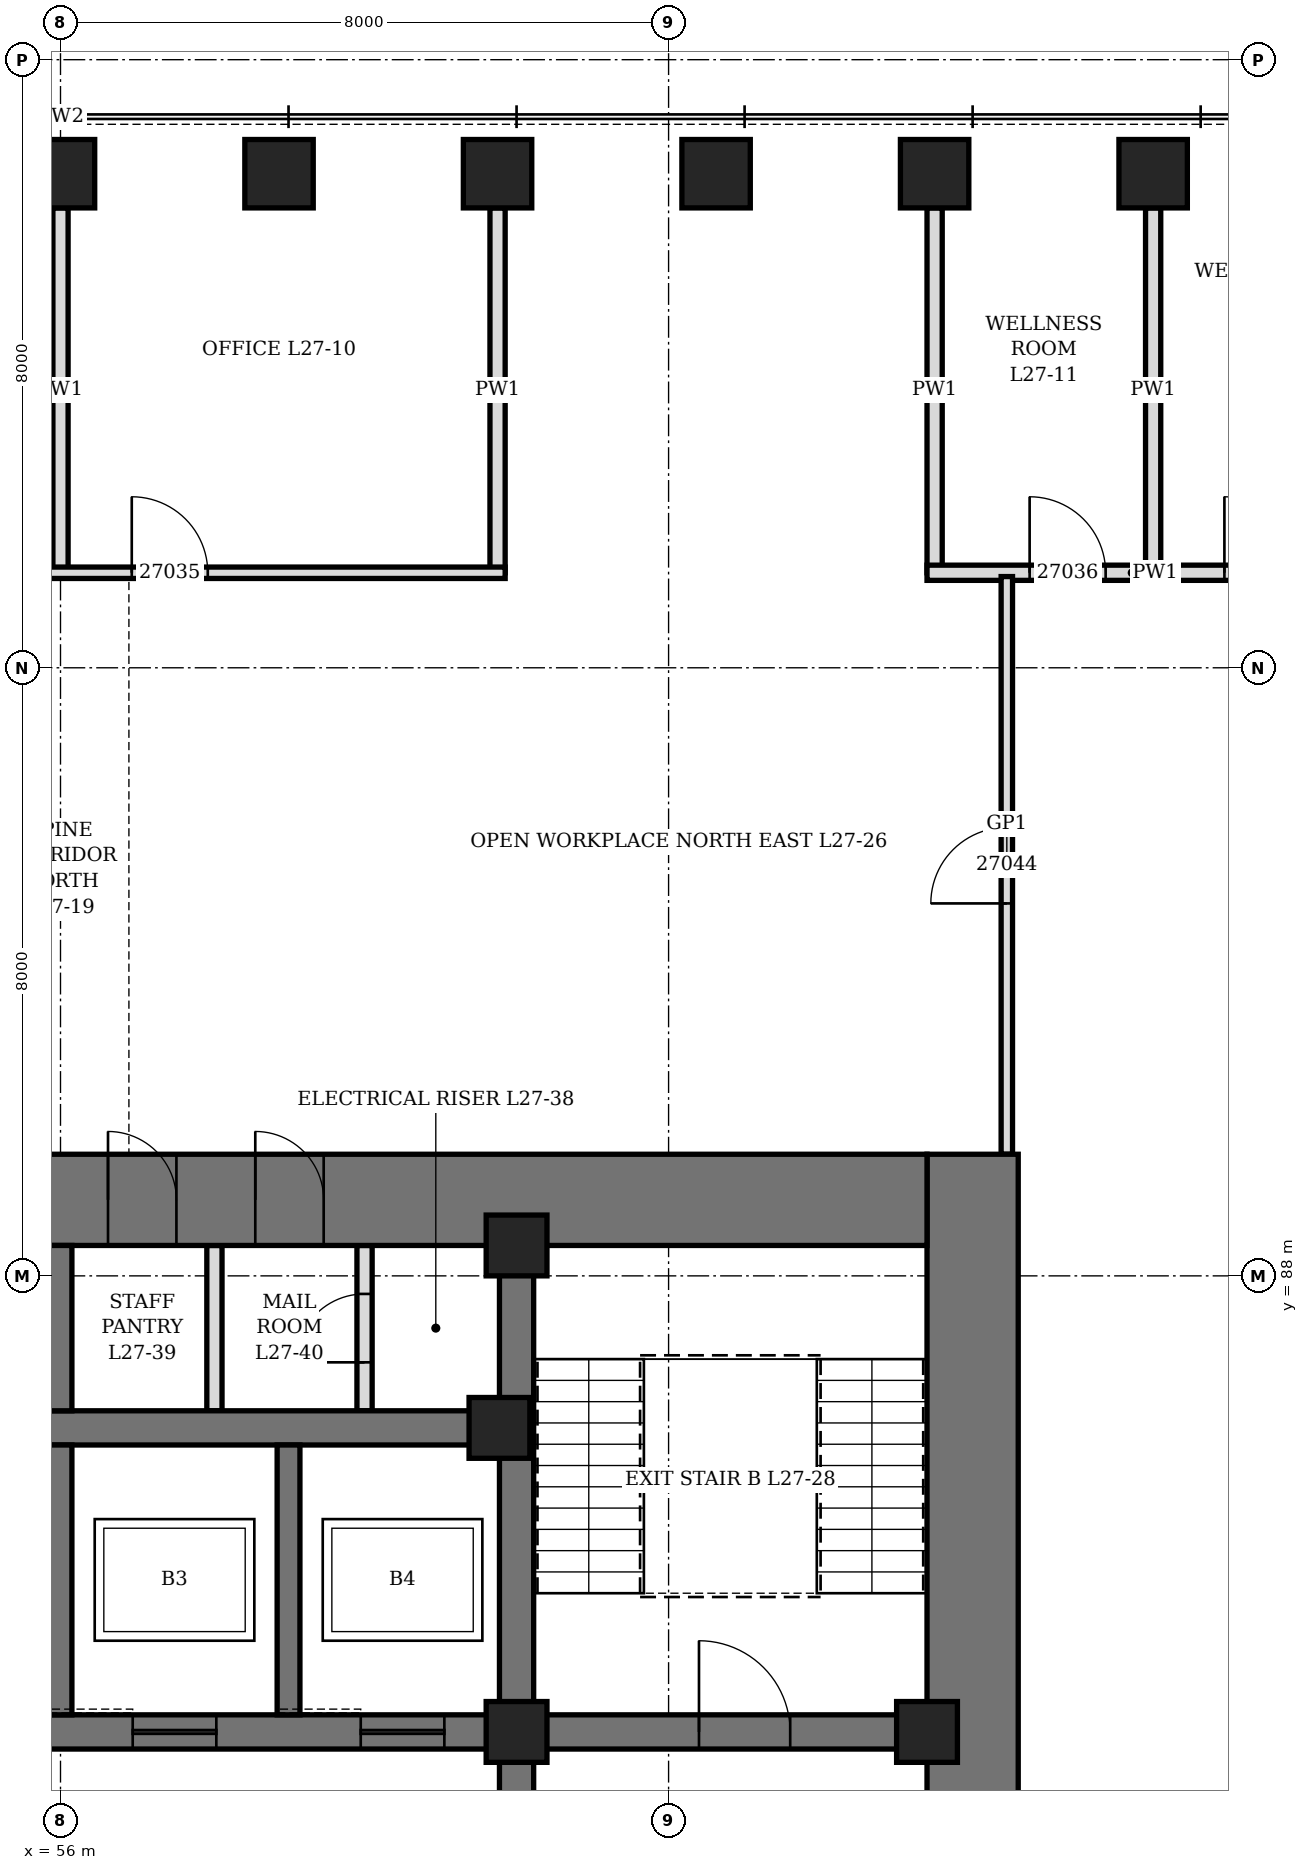
"""IFC4 building model, lengths in metres.
Left out: names, types, materials, properties, quantities, classifications, styles, units other than length and angle.
Written with IfcOpenShell. Run it as: python <this file> out.ifc"""

import sys

from ifc_helpers import new_model, si_unit, direction, frame, frame_2d, origin, origin_2d, place, context, subcontext, project, spatial, rectangle, hollow_rectangle, extrude, element, fill, save


model = new_model("IFC4")
c1 = context("Model", 3, precision=1e-05, world=origin(), true_north=direction((0.0, 1.0)))
c2 = subcontext(c1, "Body", "Model", "MODEL_VIEW")
j1 = project(units=[si_unit("LENGTHUNIT", "METRE"), si_unit("PLANEANGLEUNIT", "RADIAN")], contexts=[c1])
p1 = place(None, origin())
s1 = spatial("IfcSite", under=j1, at=p1, CompositionType="ELEMENT")
p2 = place(p1, origin())
s2 = spatial("IfcBuilding", under=s1, at=p2, CompositionType="ELEMENT")
p3 = place(p2, frame((0.0, 0.0, 124.9)))
s3 = spatial("IfcBuildingStorey", under=s2, at=p3, CompositionType="ELEMENT", Elevation=124.9)
for number, where, z_axis, x_axis in (
    (1, (70.375, 102.5, 0.0), (0.0, 0.0, 1.0), (1.0, 0.0, 0.0)),
    (2, (67.5, 102.5, 0.0), (0.0, 0.0, 1.0), (1.0, 0.0, 0.0)),
    (3, (64.625, 102.5, 0.0), (0.0, 0.0, 1.0), (1.0, 0.0, 0.0)),
    (4, (61.75, 102.5, 0.0), (0.0, 0.0, 1.0), (1.0, 0.0, 0.0)),
    (5, (58.875, 102.5, 0.0), (0.0, 0.0, 1.0), (1.0, 0.0, 0.0)),
    (6, (56.0, 102.5, 0.0), (0.0, 0.0, 1.0), (1.0, 0.0, 0.0)),
):
    element("IfcColumn", number, at=place(p3, frame(where, z_axis=z_axis, x_axis=x_axis)), inside=s3, PredefinedType="COLUMN", context=c2, shape_type="SweptSolid", body=[
        extrude(hollow_rectangle(XDim=0.9, YDim=0.9, WallThickness=0.15, at=origin_2d()), origin(), (0.0, 0.0, 1.0), 4.2),
    ])
p4 = place(p3, frame((68.0, 70.4, 0.0), z_axis=(0.0, 0.0, 1.0), x_axis=(0.0, 1.0, 0.0)))
e7 = element("IfcWall", 7, at=p4, inside=s3, PredefinedType="SHEAR", context=c2, shape_type="SweptSolid", body=[
    extrude(rectangle(XDim=19.2, YDim=1.2, at=frame_2d((9.6, 0.0))), origin(), (0.0, 0.0, 1.0), 4.2),
])
p5 = place(p4, frame((8.6, 0.0, 0.0)))
e8 = element("IfcOpeningElement", 8, at=p5, cuts=e7, PredefinedType="OPENING", context=c2, shape_type="SweptSolid", body=[
    extrude(rectangle(XDim=2.0, YDim=2.4, at=frame_2d((1.0, 1.2))), frame((0.0, 0.61, 0.0), z_axis=(0.0, -1.0, 0.0), x_axis=(1.0, 0.0, 0.0)), (0.0, 0.0, 1.0), 1.22),
])
p6 = place(p3, frame((44.6, 89.0, 0.0), z_axis=(0.0, 0.0, 1.0), x_axis=(1.0, 0.0, 0.0)))
e9 = element("IfcWall", 9, at=p6, inside=s3, PredefinedType="SHEAR", context=c2, shape_type="SweptSolid", body=[
    extrude(rectangle(XDim=22.8, YDim=1.2, at=frame_2d((11.4, 0.0))), origin(), (0.0, 0.0, 1.0), 4.2),
])
p7 = place(p6, frame((6.525, 0.0, 0.0)))
e10 = element("IfcOpeningElement", 10, at=p7, cuts=e9, PredefinedType="OPENING", context=c2, shape_type="SweptSolid", body=[
    extrude(rectangle(XDim=1.0, YDim=2.1, at=frame_2d((0.5, 1.05))), frame((0.0, 0.61, 0.0), z_axis=(0.0, -1.0, 0.0), x_axis=(1.0, 0.0, 0.0)), (0.0, 0.0, 1.0), 1.22),
])
p8 = place(p6, frame((9.45, 0.0, 0.0)))
e11 = element("IfcOpeningElement", 11, at=p8, cuts=e9, PredefinedType="OPENING", context=c2, shape_type="SweptSolid", body=[
    extrude(rectangle(XDim=0.9, YDim=2.1, at=frame_2d((0.45, 1.05))), frame((0.0, 0.61, 0.0), z_axis=(0.0, -1.0, 0.0), x_axis=(1.0, 0.0, 0.0)), (0.0, 0.0, 1.0), 1.22),
])
p9 = place(p6, frame((12.025, 0.0, 0.0)))
e12 = element("IfcOpeningElement", 12, at=p9, cuts=e9, PredefinedType="OPENING", context=c2, shape_type="SweptSolid", body=[
    extrude(rectangle(XDim=0.9, YDim=2.1, at=frame_2d((0.45, 1.05))), frame((0.0, 0.61, 0.0), z_axis=(0.0, -1.0, 0.0), x_axis=(1.0, 0.0, 0.0)), (0.0, 0.0, 1.0), 1.22),
])
p10 = place(p6, frame((13.962, 0.0, 0.0)))
e13 = element("IfcOpeningElement", 13, at=p10, cuts=e9, PredefinedType="OPENING", context=c2, shape_type="SweptSolid", body=[
    extrude(rectangle(XDim=0.9, YDim=2.1, at=frame_2d((0.45, 1.05))), frame((0.0, 0.61, 0.0), z_axis=(0.0, -1.0, 0.0), x_axis=(1.0, 0.0, 0.0)), (0.0, 0.0, 1.0), 1.22),
])
p11 = place(p3, frame((62.0, 71.6, 0.0), z_axis=(0.0, 0.0, 1.0), x_axis=(0.0, 1.0, 0.0)))
e14 = element("IfcWall", 14, at=p11, inside=s3, PredefinedType="SHEAR", context=c2, shape_type="SweptSolid", body=[
    extrude(rectangle(XDim=16.8, YDim=0.45, at=frame_2d((8.4, 0.0))), origin(), (0.0, 0.0, 1.0), 4.2),
])
p12 = place(p11, frame((7.5, 0.0, 0.0)))
e15 = element("IfcOpeningElement", 15, at=p12, cuts=e14, PredefinedType="OPENING", context=c2, shape_type="SweptSolid", body=[
    extrude(rectangle(XDim=1.8, YDim=2.4, at=frame_2d((0.9, 1.2))), frame((0.0, 0.235, 0.0), z_axis=(0.0, -1.0, 0.0), x_axis=(1.0, 0.0, 0.0)), (0.0, 0.0, 1.0), 0.47),
])
p13 = place(p3, frame((62.225, 82.0, 0.0), z_axis=(0.0, 0.0, 1.0), x_axis=(1.0, 0.0, 0.0)))
e16 = element("IfcWall", 16, at=p13, inside=s3, PredefinedType="SHEAR", context=c2, shape_type="SweptSolid", body=[
    extrude(rectangle(XDim=5.175, YDim=0.45, at=frame_2d((2.587, 0.0))), origin(), (0.0, 0.0, 1.0), 4.2),
])
p14 = place(p13, frame((2.175, 0.0, 0.0)))
e17 = element("IfcOpeningElement", 17, at=p14, cuts=e16, PredefinedType="OPENING", context=c2, shape_type="SweptSolid", body=[
    extrude(rectangle(XDim=1.2, YDim=2.1, at=frame_2d((0.6, 1.05))), frame((0.0, 0.235, 0.0), z_axis=(0.0, -1.0, 0.0), x_axis=(1.0, 0.0, 0.0)), (0.0, 0.0, 1.0), 0.47),
])
p15 = place(p3, frame((50.225, 82.0, 0.0), z_axis=(0.0, 0.0, 1.0), x_axis=(1.0, 0.0, 0.0)))
e18 = element("IfcWall", 18, at=p15, inside=s3, PredefinedType="SHEAR", context=c2, shape_type="SweptSolid", body=[
    extrude(rectangle(XDim=11.55, YDim=0.45, at=frame_2d((5.775, 0.0))), origin(), (0.0, 0.0, 1.0), 4.2),
])
p16 = place(p15, frame((0.725, 0.0, 0.0)))
e19 = element("IfcOpeningElement", 19, at=p16, cuts=e18, PredefinedType="OPENING", context=c2, shape_type="SweptSolid", body=[
    extrude(rectangle(XDim=1.1, YDim=2.2, at=frame_2d((0.55, 1.1))), frame((0.0, 0.235, 0.0), z_axis=(0.0, -1.0, 0.0), x_axis=(1.0, 0.0, 0.0)), (0.0, 0.0, 1.0), 0.47),
])
p17 = place(p15, frame((3.725, 0.0, 0.0)))
e20 = element("IfcOpeningElement", 20, at=p17, cuts=e18, PredefinedType="OPENING", context=c2, shape_type="SweptSolid", body=[
    extrude(rectangle(XDim=1.1, YDim=2.2, at=frame_2d((0.55, 1.1))), frame((0.0, 0.235, 0.0), z_axis=(0.0, -1.0, 0.0), x_axis=(1.0, 0.0, 0.0)), (0.0, 0.0, 1.0), 0.47),
])
p18 = place(p15, frame((6.725, 0.0, 0.0)))
e21 = element("IfcOpeningElement", 21, at=p18, cuts=e18, PredefinedType="OPENING", context=c2, shape_type="SweptSolid", body=[
    extrude(rectangle(XDim=1.1, YDim=2.2, at=frame_2d((0.55, 1.1))), frame((0.0, 0.235, 0.0), z_axis=(0.0, -1.0, 0.0), x_axis=(1.0, 0.0, 0.0)), (0.0, 0.0, 1.0), 0.47),
])
p19 = place(p15, frame((9.725, 0.0, 0.0)))
e22 = element("IfcOpeningElement", 22, at=p19, cuts=e18, PredefinedType="OPENING", context=c2, shape_type="SweptSolid", body=[
    extrude(rectangle(XDim=1.1, YDim=2.2, at=frame_2d((0.55, 1.1))), frame((0.0, 0.235, 0.0), z_axis=(0.0, -1.0, 0.0), x_axis=(1.0, 0.0, 0.0)), (0.0, 0.0, 1.0), 0.47),
])
p20 = place(p3, frame((50.225, 86.0, 0.0), z_axis=(0.0, 0.0, 1.0), x_axis=(1.0, 0.0, 0.0)))
e23 = element("IfcWall", 23, at=p20, inside=s3, PredefinedType="SHEAR", context=c2, shape_type="SweptSolid", body=[
    extrude(rectangle(XDim=11.55, YDim=0.45, at=frame_2d((5.775, 0.0))), origin(), (0.0, 0.0, 1.0), 4.2),
])
for number, where, z_axis, x_axis in (
    (24, (56.0, 82.225, 0.0), (0.0, 0.0, 1.0), (0.0, 1.0, 0.0)),
    (25, (59.0, 82.225, 0.0), (0.0, 0.0, 1.0), (0.0, 1.0, 0.0)),
):
    element("IfcWall", number, at=place(p3, frame(where, z_axis=z_axis, x_axis=x_axis)), inside=s3, PredefinedType="SHEAR", context=c2, shape_type="SweptSolid", body=[
        extrude(rectangle(XDim=3.55, YDim=0.3, at=frame_2d((1.775, 0.0))), origin(), (0.0, 0.0, 1.0), 4.2),
    ])
p21 = place(p3, frame((56.0, 86.225, 0.0), z_axis=(0.0, 0.0, 1.0), x_axis=(0.0, 1.0, 0.0)))
e26 = element("IfcWall", 26, at=p21, inside=s3, PredefinedType="SHEAR", context=c2, shape_type="SweptSolid", body=[
    extrude(rectangle(XDim=2.175, YDim=0.3, at=frame_2d((1.087, 0.0))), origin(), (0.0, 0.0, 1.0), 4.2),
])
for number, where, z_axis, x_axis in (
    (27, (61.775, 86.0, 0.0), (0.0, 0.0, 1.0), (1.0, 0.0, 0.0)),
    (28, (62.0, 82.0, 0.0), (0.0, 0.0, 1.0), (1.0, 0.0, 0.0)),
    (29, (62.0, 88.4, 0.0), (0.0, 0.0, 1.0), (1.0, 0.0, 0.0)),
    (30, (67.4, 82.0, 0.0), (0.0, 0.0, 1.0), (1.0, 0.0, 0.0)),
):
    element("IfcColumn", number, at=place(p3, frame(where, z_axis=z_axis, x_axis=x_axis)), inside=s3, PredefinedType="COLUMN", context=c2, shape_type="SweptSolid", body=[
        extrude(hollow_rectangle(XDim=0.8, YDim=0.8, WallThickness=0.1, at=origin_2d()), origin(), (0.0, 0.0, 1.0), 4.2),
    ])
p22 = place(p3, frame((60.0, 86.225, 0.0), z_axis=(0.0, 0.0, 1.0), x_axis=(0.0, 1.0, 0.0)))
e31 = element("IfcWall", 31, at=p22, inside=s3, PredefinedType="PARTITIONING", context=c2, shape_type="SweptSolid", body=[
    extrude(rectangle(XDim=2.175, YDim=0.2, at=frame_2d((1.087, 0.0))), origin(), (0.0, 0.0, 1.0), 4.04),
])
p23 = place(p22, frame((0.637, 0.0, 0.0)))
e32 = element("IfcOpeningElement", 32, at=p23, cuts=e31, PredefinedType="OPENING", context=c2, shape_type="SweptSolid", body=[
    extrude(rectangle(XDim=0.9, YDim=2.1, at=frame_2d((0.45, 1.05))), frame((0.0, 0.11, 0.0), z_axis=(0.0, -1.0, 0.0), x_axis=(1.0, 0.0, 0.0)), (0.0, 0.0, 1.0), 0.22),
])
p24 = place(p3, frame((58.025, 86.225, 0.0), z_axis=(0.0, 0.0, 1.0), x_axis=(0.0, 1.0, 0.0)))
e33 = element("IfcWall", 33, at=p24, inside=s3, PredefinedType="PARTITIONING", context=c2, shape_type="SweptSolid", body=[
    extrude(rectangle(XDim=2.175, YDim=0.2, at=frame_2d((1.087, 0.0))), origin(), (0.0, 0.0, 1.0), 4.04),
])
for number, where, z_axis, x_axis in (
    (34, (56.0, 97.25, 0.0), (0.0, 0.0, 1.0), (0.0, 1.0, 0.0)),
    (35, (61.75, 97.25, 0.0), (0.0, 0.0, 1.0), (0.0, 1.0, 0.0)),
):
    element("IfcWall", number, at=place(p3, frame(where, z_axis=z_axis, x_axis=x_axis)), inside=s3, PredefinedType="PARTITIONING", context=c2, shape_type="SweptSolid", body=[
        extrude(rectangle(XDim=4.8, YDim=0.2, at=frame_2d((2.4, 0.0))), origin(), (0.0, 0.0, 1.0), 3.278),
    ])
p25 = place(p3, frame((67.5, 97.25, 0.0), z_axis=(0.0, 0.0, 1.0), x_axis=(0.0, 1.0, 0.0)))
e36 = element("IfcWall", 36, at=p25, inside=s3, PredefinedType="PARTITIONING", context=c2, shape_type="SweptSolid", body=[
    extrude(rectangle(XDim=4.8, YDim=0.2, at=frame_2d((2.4, 0.0))), origin(), (0.0, 0.0, 1.0), 2.74),
])
p26 = place(p3, frame((70.375, 97.25, 0.0), z_axis=(0.0, 0.0, 1.0), x_axis=(0.0, 1.0, 0.0)))
e37 = element("IfcWall", 37, at=p26, inside=s3, PredefinedType="PARTITIONING", context=c2, shape_type="SweptSolid", body=[
    extrude(rectangle(XDim=4.8, YDim=0.2, at=frame_2d((2.4, 0.0))), origin(), (0.0, 0.0, 1.0), 3.428),
])
p27 = place(p3, frame((39.2, 97.25, 0.0), z_axis=(0.0, 0.0, 1.0), x_axis=(1.0, 0.0, 0.0)))
e38 = element("IfcWall", 38, at=p27, inside=s3, PredefinedType="PARTITIONING", context=c2, shape_type="SweptSolid", body=[
    extrude(rectangle(XDim=22.65, YDim=0.15, at=frame_2d((11.325, 0.0))), origin(), (0.0, 0.0, 1.0), 4.04),
])
p28 = place(p27, frame((0.488, 0.0, 0.0)))
e39 = element("IfcOpeningElement", 39, at=p28, cuts=e38, PredefinedType="OPENING", context=c2, shape_type="SweptSolid", body=[
    extrude(rectangle(XDim=1.0, YDim=2.4, at=frame_2d((0.5, 1.2))), frame((0.0, 0.085, 0.0), z_axis=(0.0, -1.0, 0.0), x_axis=(1.0, 0.0, 0.0)), (0.0, 0.0, 1.0), 0.17),
])
p29 = place(p27, frame((6.238, 0.0, 0.0)))
e40 = element("IfcOpeningElement", 40, at=p29, cuts=e38, PredefinedType="OPENING", context=c2, shape_type="SweptSolid", body=[
    extrude(rectangle(XDim=1.0, YDim=2.1, at=frame_2d((0.5, 1.05))), frame((0.0, 0.085, 0.0), z_axis=(0.0, -1.0, 0.0), x_axis=(1.0, 0.0, 0.0)), (0.0, 0.0, 1.0), 0.17),
])
p30 = place(p27, frame((11.988, 0.0, 0.0)))
e41 = element("IfcOpeningElement", 41, at=p30, cuts=e38, PredefinedType="OPENING", context=c2, shape_type="SweptSolid", body=[
    extrude(rectangle(XDim=1.0, YDim=2.1, at=frame_2d((0.5, 1.05))), frame((0.0, 0.085, 0.0), z_axis=(0.0, -1.0, 0.0), x_axis=(1.0, 0.0, 0.0)), (0.0, 0.0, 1.0), 0.17),
])
p31 = place(p27, frame((17.738, 0.0, 0.0)))
e42 = element("IfcOpeningElement", 42, at=p31, cuts=e38, PredefinedType="OPENING", context=c2, shape_type="SweptSolid", body=[
    extrude(rectangle(XDim=1.0, YDim=2.1, at=frame_2d((0.5, 1.05))), frame((0.0, 0.085, 0.0), z_axis=(0.0, -1.0, 0.0), x_axis=(1.0, 0.0, 0.0)), (0.0, 0.0, 1.0), 0.17),
])
p32 = place(p3, frame((67.4, 97.25, 0.0), z_axis=(0.0, 0.0, 1.0), x_axis=(1.0, 0.0, 0.0)))
e43 = element("IfcWall", 43, at=p32, inside=s3, PredefinedType="PARTITIONING", context=c2, shape_type="SweptSolid", body=[
    extrude(rectangle(XDim=5.4, YDim=0.2, at=frame_2d((2.7, 0.0))), origin(), (0.0, 0.0, 1.0), 4.04),
])
p33 = place(p32, frame((1.35, 0.0, 0.0)))
e44 = element("IfcOpeningElement", 44, at=p33, cuts=e43, PredefinedType="OPENING", context=c2, shape_type="SweptSolid", body=[
    extrude(rectangle(XDim=1.0, YDim=2.1, at=frame_2d((0.5, 1.05))), frame((0.0, 0.11, 0.0), z_axis=(0.0, -1.0, 0.0), x_axis=(1.0, 0.0, 0.0)), (0.0, 0.0, 1.0), 0.22),
])
p34 = place(p32, frame((3.913, 0.0, 0.0)))
e45 = element("IfcOpeningElement", 45, at=p34, cuts=e43, PredefinedType="OPENING", context=c2, shape_type="SweptSolid", body=[
    extrude(rectangle(XDim=1.0, YDim=2.1, at=frame_2d((0.5, 1.05))), frame((0.0, 0.11, 0.0), z_axis=(0.0, -1.0, 0.0), x_axis=(1.0, 0.0, 0.0)), (0.0, 0.0, 1.0), 0.22),
])
p35 = place(p3, frame((68.45, 89.6, 0.0), z_axis=(0.0, 0.0, 1.0), x_axis=(0.0, 1.0, 0.0)))
e46 = element("IfcWall", 46, at=p35, inside=s3, PredefinedType="PARTITIONING", context=c2, shape_type="SweptSolid", body=[
    extrude(rectangle(XDim=7.6, YDim=0.15, at=frame_2d((3.8, 0.0))), origin(), (0.0, 0.0, 1.0), 4.04),
])
p36 = place(p35, frame((3.3, 0.0, 0.0)))
e47 = element("IfcOpeningElement", 47, at=p36, cuts=e46, PredefinedType="OPENING", context=c2, shape_type="SweptSolid", body=[
    extrude(rectangle(XDim=1.0, YDim=2.4, at=frame_2d((0.5, 1.2))), frame((0.0, 0.085, 0.0), z_axis=(0.0, -1.0, 0.0), x_axis=(1.0, 0.0, 0.0)), (0.0, 0.0, 1.0), 0.17),
])
p37 = place(p9, origin())
e48 = element("IfcDoor", 48, at=p37, inside=s3, OperationType="SINGLE_SWING_LEFT", PredefinedType="DOOR", context=c2, shape_type="SweptSolid", body=[
    extrude(rectangle(XDim=0.9, YDim=2.1, at=frame_2d((0.45, 1.05))), frame((0.0, 0.35, 0.0), z_axis=(0.0, -1.0, 0.0), x_axis=(1.0, 0.0, 0.0)), (0.0, 0.0, 1.0), 0.7),
])
fill(e12, e48)
p38 = place(p10, origin())
e49 = element("IfcDoor", 49, at=p38, inside=s3, OperationType="SINGLE_SWING_LEFT", PredefinedType="DOOR", context=c2, shape_type="SweptSolid", body=[
    extrude(rectangle(XDim=0.9, YDim=2.1, at=frame_2d((0.45, 1.05))), frame((0.0, 0.35, 0.0), z_axis=(0.0, -1.0, 0.0), x_axis=(1.0, 0.0, 0.0)), (0.0, 0.0, 1.0), 0.7),
])
fill(e13, e49)
p39 = place(p23, origin())
e50 = element("IfcDoor", 50, at=p39, inside=s3, OperationType="SINGLE_SWING_LEFT", PredefinedType="DOOR", context=c2, shape_type="SweptSolid", body=[
    extrude(rectangle(XDim=0.9, YDim=2.1, at=frame_2d((0.45, 1.05))), frame((0.0, 0.1, 0.0), z_axis=(0.0, -1.0, 0.0), x_axis=(1.0, 0.0, 0.0)), (0.0, 0.0, 1.0), 0.199),
])
fill(e32, e50)
p40 = place(p14, origin())
e51 = element("IfcDoor", 51, at=p40, inside=s3, OperationType="SINGLE_SWING_LEFT", PredefinedType="DOOR", context=c2, shape_type="SweptSolid", body=[
    extrude(rectangle(XDim=1.2, YDim=2.1, at=frame_2d((0.6, 1.05))), frame((0.0, 0.225, 0.0), z_axis=(0.0, -1.0, 0.0), x_axis=(1.0, 0.0, 0.0)), (0.0, 0.0, 1.0), 0.449),
])
fill(e17, e51)
p41 = place(p18, origin())
e52 = element("IfcDoor", 52, at=p41, inside=s3, OperationType="SLIDING_TO_LEFT", PredefinedType="DOOR", context=c2, shape_type="SweptSolid", body=[
    extrude(rectangle(XDim=1.1, YDim=2.2, at=frame_2d((0.55, 1.1))), frame((0.0, 0.225, 0.0), z_axis=(0.0, -1.0, 0.0), x_axis=(1.0, 0.0, 0.0)), (0.0, 0.0, 1.0), 0.449),
])
fill(e21, e52)
p42 = place(p19, origin())
e53 = element("IfcDoor", 53, at=p42, inside=s3, OperationType="SLIDING_TO_LEFT", PredefinedType="DOOR", context=c2, shape_type="SweptSolid", body=[
    extrude(rectangle(XDim=1.1, YDim=2.2, at=frame_2d((0.55, 1.1))), frame((0.0, 0.225, 0.0), z_axis=(0.0, -1.0, 0.0), x_axis=(1.0, 0.0, 0.0)), (0.0, 0.0, 1.0), 0.449),
])
fill(e22, e53)
p43 = place(p31, origin())
e54 = element("IfcDoor", 54, at=p43, inside=s3, OperationType="SINGLE_SWING_LEFT", PredefinedType="DOOR", context=c2, shape_type="SweptSolid", body=[
    extrude(rectangle(XDim=1.0, YDim=2.1, at=frame_2d((0.5, 1.05))), frame((0.0, 0.075, 0.0), z_axis=(0.0, -1.0, 0.0), x_axis=(1.0, 0.0, 0.0)), (0.0, 0.0, 1.0), 0.149),
])
fill(e42, e54)
p44 = place(p33, origin())
e55 = element("IfcDoor", 55, at=p44, inside=s3, OperationType="SINGLE_SWING_LEFT", PredefinedType="DOOR", context=c2, shape_type="SweptSolid", body=[
    extrude(rectangle(XDim=1.0, YDim=2.1, at=frame_2d((0.5, 1.05))), frame((0.0, 0.1, 0.0), z_axis=(0.0, -1.0, 0.0), x_axis=(1.0, 0.0, 0.0)), (0.0, 0.0, 1.0), 0.199),
])
fill(e44, e55)
p45 = place(p34, origin())
e56 = element("IfcDoor", 56, at=p45, inside=s3, OperationType="SINGLE_SWING_LEFT", PredefinedType="DOOR", context=c2, shape_type="SweptSolid", body=[
    extrude(rectangle(XDim=1.0, YDim=2.1, at=frame_2d((0.5, 1.05))), frame((0.0, 0.1, 0.0), z_axis=(0.0, -1.0, 0.0), x_axis=(1.0, 0.0, 0.0)), (0.0, 0.0, 1.0), 0.199),
])
fill(e45, e56)
p46 = place(p36, origin())
e57 = element("IfcDoor", 57, at=p46, inside=s3, OperationType="SINGLE_SWING_RIGHT", PredefinedType="DOOR", context=c2, shape_type="SweptSolid", body=[
    extrude(rectangle(XDim=1.0, YDim=2.4, at=frame_2d((0.5, 1.2))), frame((0.0, 0.075, 0.0), z_axis=(0.0, -1.0, 0.0), x_axis=(1.0, 0.0, 0.0)), (0.0, 0.0, 1.0), 0.149),
])
fill(e47, e57)
save(model, sys.argv[1])
